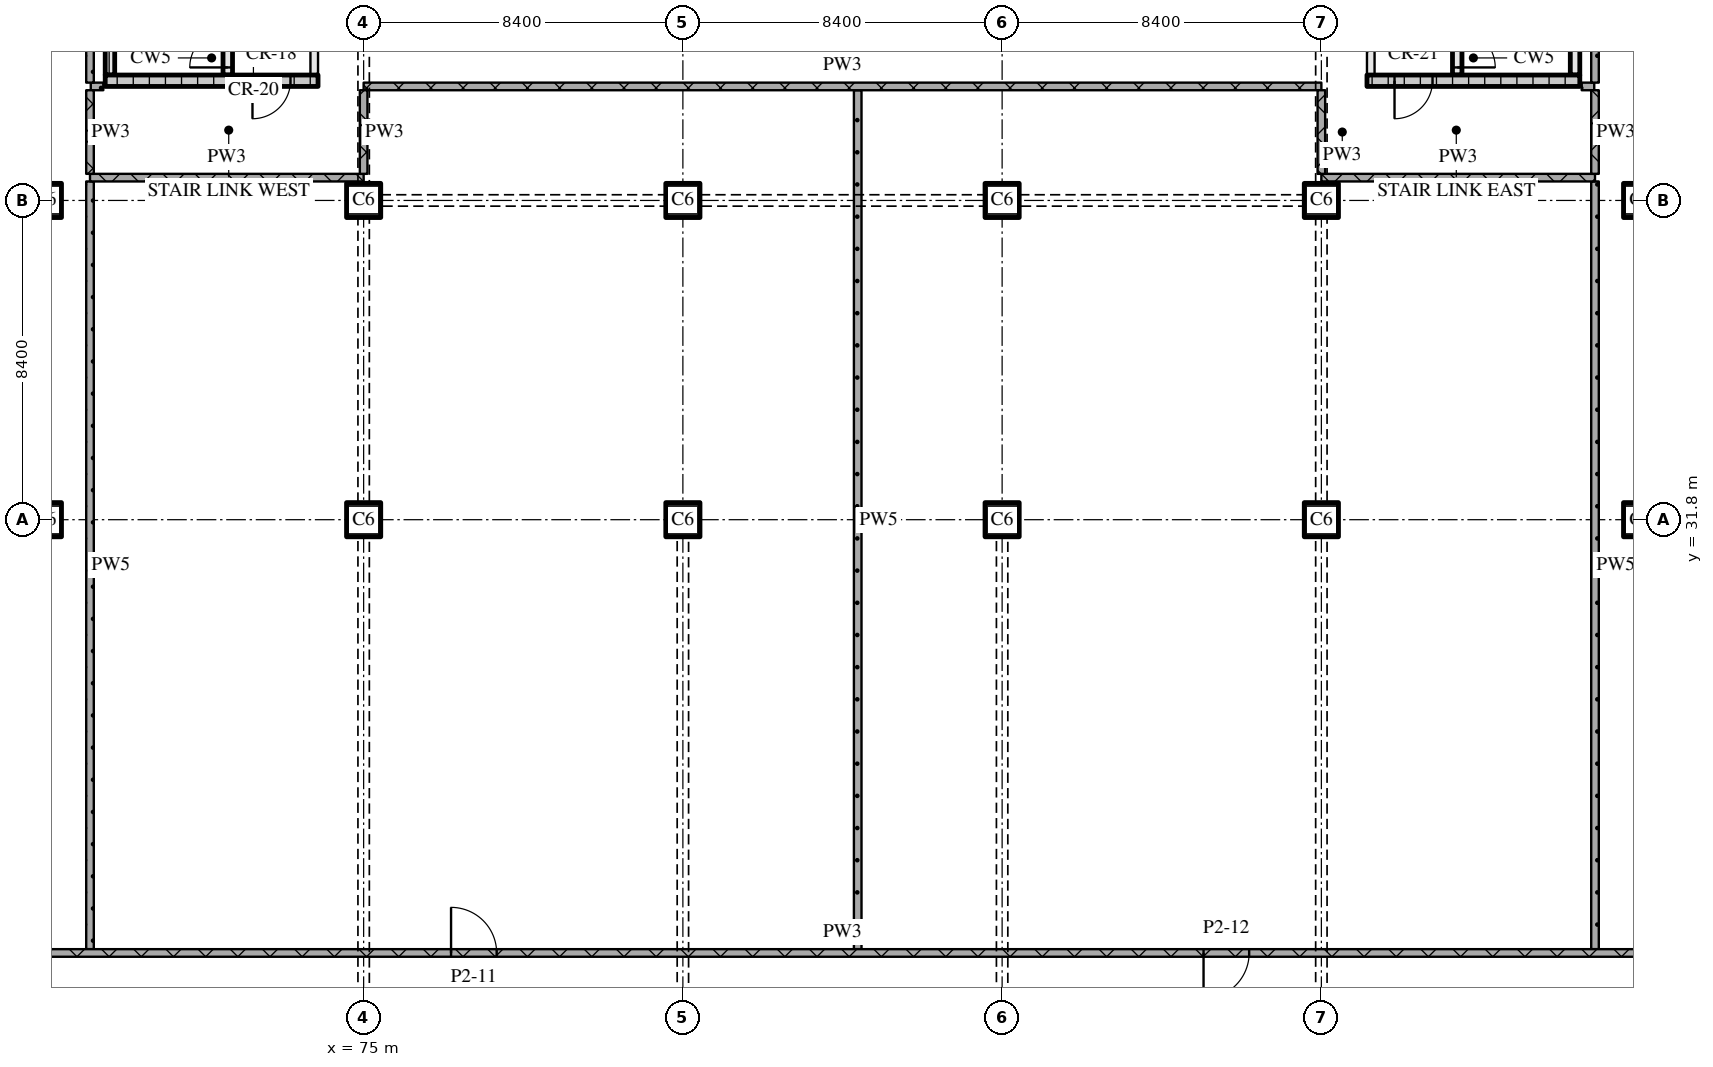
"""IFC4 building model, lengths in metres.
Left out: names, types, materials, properties, quantities, classifications, styles, units other than length and angle.
Written with IfcOpenShell. Run it as: python <this file> out.ifc"""

import sys

from ifc_helpers import new_model, si_unit, direction, frame, frame_2d, origin, origin_2d, place, context, subcontext, project, spatial, rectangle, extrude, element, fill, save


model = new_model("IFC4")
c1 = context("Model", 3, precision=1e-05, world=origin(), true_north=direction((0.0, 1.0)))
c2 = subcontext(c1, "Body", "Model", "MODEL_VIEW")
j1 = project(units=[si_unit("LENGTHUNIT", "METRE"), si_unit("PLANEANGLEUNIT", "RADIAN")], contexts=[c1])
p1 = place(None, origin())
s1 = spatial("IfcSite", under=j1, at=p1, CompositionType="ELEMENT")
p2 = place(p1, origin())
s2 = spatial("IfcBuilding", under=s1, at=p2, CompositionType="ELEMENT")
p3 = place(p2, frame((0.0, 0.0, 14.4)))
s3 = spatial("IfcBuildingStorey", under=s2, at=p3, CompositionType="ELEMENT", Elevation=14.4)
for number, where, z_axis, x_axis in (
    (1, (66.6, 31.8, 0.0), (0.0, 0.0, 1.0), (1.0, 0.0, 0.0)),
    (2, (66.6, 40.2, 0.0), (0.0, 0.0, 1.0), (1.0, 0.0, 0.0)),
    (3, (75.0, 31.8, 0.0), (0.0, 0.0, 1.0), (1.0, 0.0, 0.0)),
    (4, (75.0, 40.2, 0.0), (0.0, 0.0, 1.0), (1.0, 0.0, 0.0)),
    (5, (83.4, 31.8, 0.0), (0.0, 0.0, 1.0), (1.0, 0.0, 0.0)),
    (6, (83.4, 40.2, 0.0), (0.0, 0.0, 1.0), (1.0, 0.0, 0.0)),
    (7, (91.8, 31.8, 0.0), (0.0, 0.0, 1.0), (1.0, 0.0, 0.0)),
    (8, (91.8, 40.2, 0.0), (0.0, 0.0, 1.0), (1.0, 0.0, 0.0)),
    (9, (100.2, 31.8, 0.0), (0.0, 0.0, 1.0), (1.0, 0.0, 0.0)),
    (10, (100.2, 40.2, 0.0), (0.0, 0.0, 1.0), (1.0, 0.0, 0.0)),
    (11, (108.6, 31.8, 0.0), (0.0, 0.0, 1.0), (1.0, 0.0, 0.0)),
    (12, (108.6, 40.2, 0.0), (0.0, 0.0, 1.0), (1.0, 0.0, 0.0)),
):
    element("IfcColumn", number, at=place(p3, frame(where, z_axis=z_axis, x_axis=x_axis)), inside=s3, PredefinedType="COLUMN", context=c2, shape_type="SweptSolid", body=[
        extrude(rectangle(XDim=0.9, YDim=0.9, at=origin_2d()), origin(), (0.0, 0.0, 1.0), 4.8),
    ])
p4 = place(p3, frame((68.2, 43.35, 0.0), z_axis=(0.0, 0.0, 1.0), x_axis=(1.0, 0.0, 0.0)))
e13 = element("IfcWall", 13, at=p4, inside=s3, PredefinedType="SOLIDWALL", context=c2, shape_type="SweptSolid", body=[
    extrude(rectangle(XDim=5.6, YDim=0.3, at=frame_2d((2.8, 0.0))), origin(), (0.0, 0.0, 1.0), 4.5),
])
p5 = place(p4, frame((3.875, 0.0, 0.0)))
e14 = element("IfcOpeningElement", 14, at=p5, cuts=e13, PredefinedType="OPENING", context=c2, shape_type="SweptSolid", body=[
    extrude(rectangle(XDim=1.0, YDim=2.1, at=frame_2d((0.5, 1.05))), frame((0.0, 0.16, 0.0), z_axis=(0.0, -1.0, 0.0), x_axis=(1.0, 0.0, 0.0)), (0.0, 0.0, 1.0), 0.32),
])
p6 = place(p3, frame((68.325, 43.5, 0.0), z_axis=(0.0, 0.0, 1.0), x_axis=(0.0, 1.0, 0.0)))
e15 = element("IfcWall", 15, at=p6, inside=s3, PredefinedType="SOLIDWALL", context=c2, shape_type="SweptSolid", body=[
    extrude(rectangle(XDim=6.9, YDim=0.25, at=frame_2d((3.45, 0.0))), origin(), (0.0, 0.0, 1.0), 4.5),
])
p7 = place(p3, frame((71.425, 43.5, 0.0), z_axis=(0.0, 0.0, 1.0), x_axis=(0.0, 1.0, 0.0)))
e16 = element("IfcWall", 16, at=p7, inside=s3, PredefinedType="SOLIDWALL", context=c2, shape_type="SweptSolid", body=[
    extrude(rectangle(XDim=6.9, YDim=0.25, at=frame_2d((3.45, 0.0))), origin(), (0.0, 0.0, 1.0), 4.5),
])
p8 = place(p7, frame((0.2, 0.0, 0.0)))
e17 = element("IfcOpeningElement", 17, at=p8, cuts=e16, PredefinedType="OPENING", context=c2, shape_type="SweptSolid", body=[
    extrude(rectangle(XDim=1.0, YDim=2.1, at=frame_2d((0.5, 1.05))), frame((0.0, 0.135, 0.0), z_axis=(0.0, -1.0, 0.0), x_axis=(1.0, 0.0, 0.0)), (0.0, 0.0, 1.0), 0.27),
])
p9 = place(p3, frame((73.7, 43.5, 0.0), z_axis=(0.0, 0.0, 1.0), x_axis=(0.0, 1.0, 0.0)))
e18 = element("IfcWall", 18, at=p9, inside=s3, PredefinedType="PARTITIONING", context=c2, shape_type="SweptSolid", body=[
    extrude(rectangle(XDim=6.9, YDim=0.2, at=frame_2d((3.45, 0.0))), origin(), (0.0, 0.0, 1.0), 4.5),
])
p10 = place(p9, frame((1.0, 0.0, 0.0)))
e19 = element("IfcOpeningElement", 19, at=p10, cuts=e18, PredefinedType="OPENING", context=c2, shape_type="SweptSolid", body=[
    extrude(rectangle(XDim=1.0, YDim=2.1, at=frame_2d((0.5, 1.05))), frame((0.0, 0.11, 0.0), z_axis=(0.0, -1.0, 0.0), x_axis=(1.0, 0.0, 0.0)), (0.0, 0.0, 1.0), 0.22),
])
p11 = place(p3, frame((101.4, 43.35, 0.0), z_axis=(0.0, 0.0, 1.0), x_axis=(1.0, 0.0, 0.0)))
e20 = element("IfcWall", 20, at=p11, inside=s3, PredefinedType="SOLIDWALL", context=c2, shape_type="SweptSolid", body=[
    extrude(rectangle(XDim=5.6, YDim=0.3, at=frame_2d((2.8, 0.0))), origin(), (0.0, 0.0, 1.0), 4.5),
])
p12 = place(p11, frame((0.725, 0.0, 0.0)))
e21 = element("IfcOpeningElement", 21, at=p12, cuts=e20, PredefinedType="OPENING", context=c2, shape_type="SweptSolid", body=[
    extrude(rectangle(XDim=1.0, YDim=2.1, at=frame_2d((0.5, 1.05))), frame((0.0, 0.16, 0.0), z_axis=(0.0, -1.0, 0.0), x_axis=(1.0, 0.0, 0.0)), (0.0, 0.0, 1.0), 0.32),
])
p13 = place(p3, frame((101.5, 43.5, 0.0), z_axis=(0.0, 0.0, 1.0), x_axis=(0.0, 1.0, 0.0)))
e22 = element("IfcWall", 22, at=p13, inside=s3, PredefinedType="PARTITIONING", context=c2, shape_type="SweptSolid", body=[
    extrude(rectangle(XDim=6.9, YDim=0.2, at=frame_2d((3.45, 0.0))), origin(), (0.0, 0.0, 1.0), 4.5),
])
p14 = place(p13, frame((1.0, 0.0, 0.0)))
e23 = element("IfcOpeningElement", 23, at=p14, cuts=e22, PredefinedType="OPENING", context=c2, shape_type="SweptSolid", body=[
    extrude(rectangle(XDim=1.0, YDim=2.1, at=frame_2d((0.5, 1.05))), frame((0.0, 0.11, 0.0), z_axis=(0.0, -1.0, 0.0), x_axis=(1.0, 0.0, 0.0)), (0.0, 0.0, 1.0), 0.22),
])
p15 = place(p3, frame((103.775, 43.5, 0.0), z_axis=(0.0, 0.0, 1.0), x_axis=(0.0, 1.0, 0.0)))
e24 = element("IfcWall", 24, at=p15, inside=s3, PredefinedType="SOLIDWALL", context=c2, shape_type="SweptSolid", body=[
    extrude(rectangle(XDim=6.9, YDim=0.25, at=frame_2d((3.45, 0.0))), origin(), (0.0, 0.0, 1.0), 4.5),
])
p16 = place(p15, frame((0.2, 0.0, 0.0)))
e25 = element("IfcOpeningElement", 25, at=p16, cuts=e24, PredefinedType="OPENING", context=c2, shape_type="SweptSolid", body=[
    extrude(rectangle(XDim=1.0, YDim=2.1, at=frame_2d((0.5, 1.05))), frame((0.0, 0.135, 0.0), z_axis=(0.0, -1.0, 0.0), x_axis=(1.0, 0.0, 0.0)), (0.0, 0.0, 1.0), 0.27),
])
p17 = place(p3, frame((106.875, 43.5, 0.0), z_axis=(0.0, 0.0, 1.0), x_axis=(0.0, 1.0, 0.0)))
e26 = element("IfcWall", 26, at=p17, inside=s3, PredefinedType="SOLIDWALL", context=c2, shape_type="SweptSolid", body=[
    extrude(rectangle(XDim=6.9, YDim=0.25, at=frame_2d((3.45, 0.0))), origin(), (0.0, 0.0, 1.0), 4.5),
])
p18 = place(p3, frame((35.4, 20.4, 0.0), z_axis=(0.0, 0.0, 1.0), x_axis=(1.0, 0.0, 0.0)))
e27 = element("IfcWall", 27, at=p18, inside=s3, PredefinedType="PARTITIONING", context=c2, shape_type="SweptSolid", body=[
    extrude(rectangle(XDim=104.4, YDim=0.2, at=frame_2d((52.2, 0.0))), origin(), (0.0, 0.0, 1.0), 4.5),
])
p19 = place(p18, frame((41.9, 0.0, 0.0)))
e28 = element("IfcOpeningElement", 28, at=p19, cuts=e27, PredefinedType="OPENING", context=c2, shape_type="SweptSolid", body=[
    extrude(rectangle(XDim=1.2, YDim=2.1, at=frame_2d((0.6, 1.05))), frame((0.0, 0.11, 0.0), z_axis=(0.0, -1.0, 0.0), x_axis=(1.0, 0.0, 0.0)), (0.0, 0.0, 1.0), 0.22),
])
p20 = place(p18, frame((61.7, 0.0, 0.0)))
e29 = element("IfcOpeningElement", 29, at=p20, cuts=e27, PredefinedType="OPENING", context=c2, shape_type="SweptSolid", body=[
    extrude(rectangle(XDim=1.2, YDim=2.1, at=frame_2d((0.6, 1.05))), frame((0.0, 0.11, 0.0), z_axis=(0.0, -1.0, 0.0), x_axis=(1.0, 0.0, 0.0)), (0.0, 0.0, 1.0), 0.22),
])
p21 = place(p18, frame((87.6, 0.0, 0.0)))
e30 = element("IfcOpeningElement", 30, at=p21, cuts=e27, PredefinedType="OPENING", context=c2, shape_type="SweptSolid", body=[
    extrude(rectangle(XDim=1.2, YDim=2.1, at=frame_2d((0.6, 1.05))), frame((0.0, 0.11, 0.0), z_axis=(0.0, -1.0, 0.0), x_axis=(1.0, 0.0, 0.0)), (0.0, 0.0, 1.0), 0.22),
])
for number, where, z_axis, x_axis in (
    (31, (67.8, 40.8, 0.0), (0.0, 0.0, 1.0), (1.0, 0.0, 0.0)),
    (32, (100.2, 40.8, 0.0), (0.0, 0.0, 1.0), (1.0, 0.0, 0.0)),
):
    element("IfcWall", number, at=place(p3, frame(where, z_axis=z_axis, x_axis=x_axis)), inside=s3, PredefinedType="PARTITIONING", context=c2, shape_type="SweptSolid", body=[
        extrude(rectangle(XDim=7.2, YDim=0.2, at=frame_2d((3.6, 0.0))), origin(), (0.0, 0.0, 1.0), 4.5),
    ])
p22 = place(p3, frame((75.0, 43.2, 0.0), z_axis=(0.0, 0.0, 1.0), x_axis=(1.0, 0.0, 0.0)))
e33 = element("IfcWall", 33, at=p22, inside=s3, PredefinedType="PARTITIONING", context=c2, shape_type="SweptSolid", body=[
    extrude(rectangle(XDim=25.2, YDim=0.2, at=frame_2d((12.6, 0.0))), origin(), (0.0, 0.0, 1.0), 4.5),
])
for number, where, z_axis, x_axis in (
    (34, (67.82, 43.2, 0.0), (0.0, 0.0, 1.0), (1.0, 0.0, 0.0)),
    (35, (107.05, 43.2, 0.0), (0.0, 0.0, 1.0), (1.0, 0.0, 0.0)),
):
    element("IfcWall", number, at=place(p3, frame(where, z_axis=z_axis, x_axis=x_axis)), inside=s3, PredefinedType="PARTITIONING", context=c2, shape_type="SweptSolid", body=[
        extrude(rectangle(XDim=0.33, YDim=0.2, at=frame_2d((0.165, 0.0))), origin(), (0.0, 0.0, 1.0), 4.5),
    ])
p23 = place(p3, frame((67.8, 43.1, 0.0), z_axis=(0.0, 0.0, 1.0), x_axis=(0.0, -1.0, 0.0)))
e36 = element("IfcWall", 36, at=p23, inside=s3, PredefinedType="PARTITIONING", context=c2, shape_type="SweptSolid", body=[
    extrude(rectangle(XDim=2.2, YDim=0.2, at=frame_2d((1.1, 0.0))), origin(), (0.0, 0.0, 1.0), 4.5),
])
p24 = place(p3, frame((67.8, 49.9, 0.0), z_axis=(0.0, 0.0, 1.0), x_axis=(0.0, -1.0, 0.0)))
e37 = element("IfcWall", 37, at=p24, inside=s3, PredefinedType="PARTITIONING", context=c2, shape_type="SweptSolid", body=[
    extrude(rectangle(XDim=6.6, YDim=0.2, at=frame_2d((3.3, 0.0))), origin(), (0.0, 0.0, 1.0), 4.5),
])
p25 = place(p3, frame((67.8, 40.7, 0.0), z_axis=(0.0, 0.0, 1.0), x_axis=(0.0, -1.0, 0.0)))
e38 = element("IfcWall", 38, at=p25, inside=s3, PredefinedType="PARTITIONING", context=c2, shape_type="SweptSolid", body=[
    extrude(rectangle(XDim=20.2, YDim=0.2, at=frame_2d((10.1, 0.0))), origin(), (0.0, 0.0, 1.0), 4.5),
])
p26 = place(p3, frame((75.0, 43.1, 0.0), z_axis=(0.0, 0.0, 1.0), x_axis=(0.0, -1.0, 0.0)))
e39 = element("IfcWall", 39, at=p26, inside=s3, PredefinedType="PARTITIONING", context=c2, shape_type="SweptSolid", body=[
    extrude(rectangle(XDim=2.2, YDim=0.2, at=frame_2d((1.1, 0.0))), origin(), (0.0, 0.0, 1.0), 3.6),
])
p27 = place(p3, frame((88.0, 43.1, 0.0), z_axis=(0.0, 0.0, 1.0), x_axis=(0.0, -1.0, 0.0)))
e40 = element("IfcWall", 40, at=p27, inside=s3, PredefinedType="PARTITIONING", context=c2, shape_type="SweptSolid", body=[
    extrude(rectangle(XDim=22.6, YDim=0.2, at=frame_2d((11.3, 0.0))), origin(), (0.0, 0.0, 1.0), 4.5),
])
p28 = place(p3, frame((100.2, 43.1, 0.0), z_axis=(0.0, 0.0, 1.0), x_axis=(0.0, -1.0, 0.0)))
e41 = element("IfcWall", 41, at=p28, inside=s3, PredefinedType="PARTITIONING", context=c2, shape_type="SweptSolid", body=[
    extrude(rectangle(XDim=2.2, YDim=0.2, at=frame_2d((1.1, 0.0))), origin(), (0.0, 0.0, 1.0), 3.6),
])
p29 = place(p3, frame((107.4, 43.1, 0.0), z_axis=(0.0, 0.0, 1.0), x_axis=(0.0, -1.0, 0.0)))
e42 = element("IfcWall", 42, at=p29, inside=s3, PredefinedType="PARTITIONING", context=c2, shape_type="SweptSolid", body=[
    extrude(rectangle(XDim=2.2, YDim=0.2, at=frame_2d((1.1, 0.0))), origin(), (0.0, 0.0, 1.0), 4.5),
])
p30 = place(p3, frame((107.4, 47.9, 0.0), z_axis=(0.0, 0.0, 1.0), x_axis=(0.0, -1.0, 0.0)))
e43 = element("IfcWall", 43, at=p30, inside=s3, PredefinedType="PARTITIONING", context=c2, shape_type="SweptSolid", body=[
    extrude(rectangle(XDim=4.6, YDim=0.2, at=frame_2d((2.3, 0.0))), origin(), (0.0, 0.0, 1.0), 4.5),
])
p31 = place(p3, frame((107.4, 40.7, 0.0), z_axis=(0.0, 0.0, 1.0), x_axis=(0.0, -1.0, 0.0)))
e44 = element("IfcWall", 44, at=p31, inside=s3, PredefinedType="PARTITIONING", context=c2, shape_type="SweptSolid", body=[
    extrude(rectangle(XDim=20.2, YDim=0.2, at=frame_2d((10.1, 0.0))), origin(), (0.0, 0.0, 1.0), 4.5),
])
p32 = place(p5, origin())
e45 = element("IfcDoor", 45, at=p32, inside=s3, OperationType="SINGLE_SWING_RIGHT", PredefinedType="DOOR", context=c2, shape_type="SweptSolid", body=[
    extrude(rectangle(XDim=1.0, YDim=2.1, at=frame_2d((0.5, 1.05))), frame((0.0, 0.025, 0.0), z_axis=(0.0, -1.0, 0.0), x_axis=(1.0, 0.0, 0.0)), (0.0, 0.0, 1.0), 0.05),
])
fill(e14, e45)
p33 = place(p8, origin())
e46 = element("IfcDoor", 46, at=p33, inside=s3, OperationType="SINGLE_SWING_LEFT", PredefinedType="DOOR", context=c2, shape_type="SweptSolid", body=[
    extrude(rectangle(XDim=1.0, YDim=2.1, at=frame_2d((0.5, 1.05))), frame((0.0, 0.025, 0.0), z_axis=(0.0, -1.0, 0.0), x_axis=(1.0, 0.0, 0.0)), (0.0, 0.0, 1.0), 0.05),
])
fill(e17, e46)
p34 = place(p12, origin())
e47 = element("IfcDoor", 47, at=p34, inside=s3, OperationType="SINGLE_SWING_RIGHT", PredefinedType="DOOR", context=c2, shape_type="SweptSolid", body=[
    extrude(rectangle(XDim=1.0, YDim=2.1, at=frame_2d((0.5, 1.05))), frame((0.0, 0.025, 0.0), z_axis=(0.0, -1.0, 0.0), x_axis=(1.0, 0.0, 0.0)), (0.0, 0.0, 1.0), 0.05),
])
fill(e21, e47)
p35 = place(p16, origin())
e48 = element("IfcDoor", 48, at=p35, inside=s3, OperationType="SINGLE_SWING_RIGHT", PredefinedType="DOOR", context=c2, shape_type="SweptSolid", body=[
    extrude(rectangle(XDim=1.0, YDim=2.1, at=frame_2d((0.5, 1.05))), frame((0.0, 0.025, 0.0), z_axis=(0.0, -1.0, 0.0), x_axis=(1.0, 0.0, 0.0)), (0.0, 0.0, 1.0), 0.05),
])
fill(e25, e48)
p36 = place(p19, origin())
e49 = element("IfcDoor", 49, at=p36, inside=s3, OperationType="SINGLE_SWING_LEFT", PredefinedType="DOOR", context=c2, shape_type="SweptSolid", body=[
    extrude(rectangle(XDim=1.2, YDim=2.1, at=frame_2d((0.6, 1.05))), frame((0.0, 0.025, 0.0), z_axis=(0.0, -1.0, 0.0), x_axis=(1.0, 0.0, 0.0)), (0.0, 0.0, 1.0), 0.05),
])
fill(e28, e49)
p37 = place(p20, origin())
e50 = element("IfcDoor", 50, at=p37, inside=s3, OperationType="SINGLE_SWING_RIGHT", PredefinedType="DOOR", context=c2, shape_type="SweptSolid", body=[
    extrude(rectangle(XDim=1.2, YDim=2.1, at=frame_2d((0.6, 1.05))), frame((0.0, 0.025, 0.0), z_axis=(0.0, -1.0, 0.0), x_axis=(1.0, 0.0, 0.0)), (0.0, 0.0, 1.0), 0.05),
])
fill(e29, e50)
save(model, sys.argv[1])
